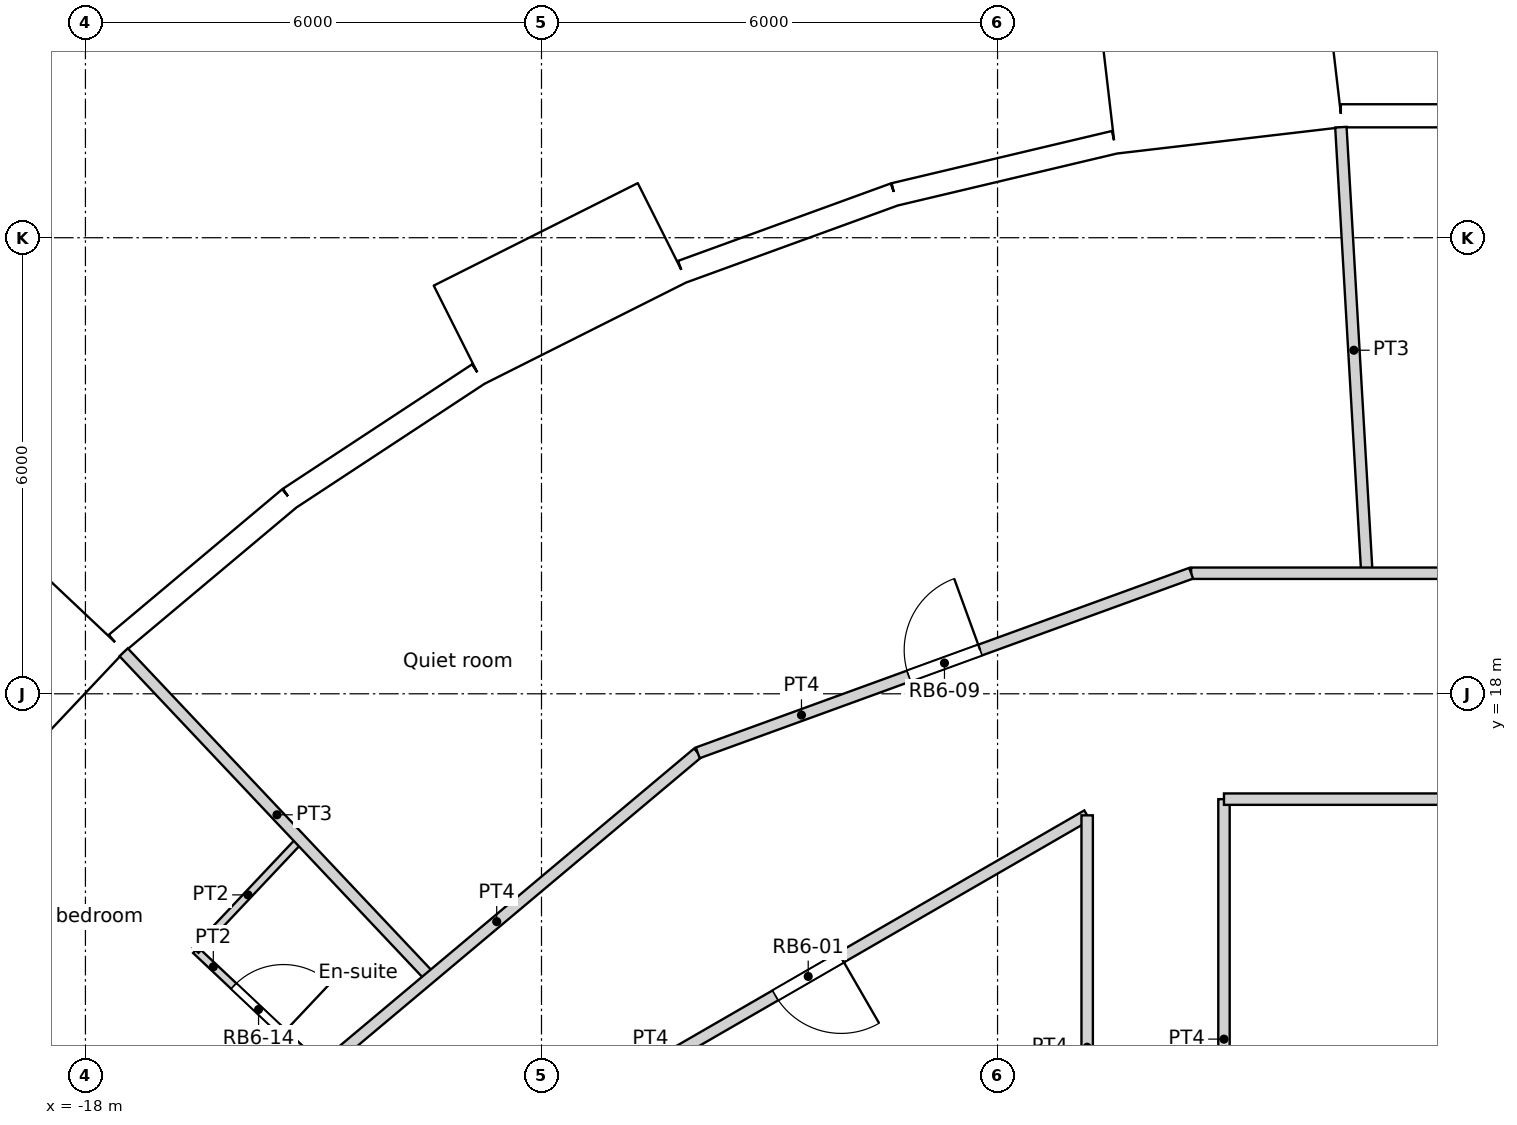
"""IFC4 building model, lengths in metres.
Left out: names, types, materials, properties, quantities, classifications, styles, units other than length and angle.
Written with IfcOpenShell. Run it as: python <this file> out.ifc"""

import sys

from ifc_helpers import new_model, si_unit, direction, frame, frame_2d, origin, origin_2d, place, context, subcontext, project, spatial, rectangle, circle, extrude, element, fill, save


model = new_model("IFC4")
c1 = context("Model", 3, precision=1e-05, world=origin(), true_north=direction((0.0, 1.0)))
c2 = subcontext(c1, "Body", "Model", "MODEL_VIEW")
j1 = project(units=[si_unit("LENGTHUNIT", "METRE"), si_unit("PLANEANGLEUNIT", "RADIAN")], contexts=[c1])
p1 = place(None, origin())
s1 = spatial("IfcSite", under=j1, at=p1, CompositionType="ELEMENT")
p2 = place(p1, origin())
s2 = spatial("IfcBuilding", under=s1, at=p2, CompositionType="ELEMENT")
p3 = place(p2, frame((0.0, 0.0, 180.0)))
s3 = spatial("IfcBuildingStorey", under=s2, at=p3, CompositionType="ELEMENT", Elevation=180.0)
for number, where, z_axis, x_axis in (
    (1, (-1.427, 24.506, 0.0), (0.0, 0.0, 1.0), (1.0, 0.0, 0.0)),
    (2, (-7.04, 23.516, 0.0), (0.0, 0.0, 1.0), (1.0, 0.0, 0.0)),
    (3, (-12.274, 21.259, 0.0), (0.0, 0.0, 1.0), (1.0, 0.0, 0.0)),
    (4, (-16.846, 17.855, 0.0), (0.0, 0.0, 1.0), (1.0, 0.0, 0.0)),
):
    element("IfcColumn", number, at=place(p3, frame(where, z_axis=z_axis, x_axis=x_axis)), inside=s3, PredefinedType="COLUMN", context=c2, shape_type="SweptSolid", body=[
        extrude(circle(Radius=0.6, at=origin_2d()), origin(), (0.0, 0.0, 1.0), 3.6),
    ])
for number, where, z_axis, x_axis in (
    (5, (-4.188, 18.35, 0.0), (0.0, 0.0, 1.0), (1.0, 0.0, 0.0)),
    (6, (-9.411, 16.301, 0.0), (0.0, 0.0, 1.0), (1.0, 0.0, 0.0)),
    (7, (-13.798, 12.802, 0.0), (0.0, 0.0, 1.0), (1.0, 0.0, 0.0)),
):
    element("IfcColumn", number, at=place(p3, frame(where, z_axis=z_axis, x_axis=x_axis)), inside=s3, PredefinedType="COLUMN", context=c2, shape_type="SweptSolid", body=[
        extrude(circle(Radius=0.65, at=origin_2d()), origin(), (0.0, 0.0, 1.0), 3.6),
    ])
p4 = place(p3, frame((1.491, 25.604, 0.0), z_axis=(0.0, 0.0, 1.0), x_axis=(-1.0, 0.0, 0.0)))
e8 = element("IfcWall", 8, at=p4, inside=s3, PredefinedType="SOLIDWALL", context=c2, shape_type="SweptSolid", body=[
    extrude(rectangle(XDim=2.973, YDim=0.3, at=frame_2d((1.486, 0.0))), origin(), (0.0, 0.0, 1.0), 3.3),
])
p5 = place(p4, frame((1.486, 0.0, 1.55)))
e9 = element("IfcOpeningElement", 9, at=p5, cuts=e8, PredefinedType="OPENING", context=c2, shape_type="SweptSolid", body=[
    extrude(circle(Radius=0.9, at=origin_2d()), frame((0.0, 0.16, 0.0), z_axis=(0.0, -1.0, 0.0), x_axis=(1.0, 0.0, 0.0)), (0.0, 0.0, 1.0), 0.32),
])
p6 = place(p3, frame((-1.549, 26.176, -0.3), z_axis=(0.0, 0.0, 1.0), x_axis=(-0.9932342274, -0.116128246006, 0.0)))
e10 = element("IfcWall", 10, at=p6, inside=s3, PredefinedType="ELEMENTEDWALL", context=c2, shape_type="SweptSolid", body=[
    extrude(rectangle(XDim=3.0, YDim=1.45, at=frame_2d((1.5, 0.0))), origin(), (0.0, 0.0, 1.0), 3.6),
])
p7 = place(p6, frame((1.5, 0.0, 1.85)))
e11 = element("IfcOpeningElement", 11, at=p7, cuts=e10, PredefinedType="OPENING", context=c2, shape_type="SweptSolid", body=[
    extrude(circle(Radius=0.9, at=origin_2d()), frame((0.0, 0.735, 0.0), z_axis=(0.0, -1.0, 0.0), x_axis=(1.0, 0.0, 0.0)), (0.0, 0.0, 1.0), 1.47),
])
p8 = place(p3, frame((-4.463, 25.256, 0.0), z_axis=(0.0, 0.0, 1.0), x_axis=(-0.973045378923, -0.230613725862, 0.0)))
e12 = element("IfcWall", 12, at=p8, inside=s3, PredefinedType="SOLIDWALL", context=c2, shape_type="SweptSolid", body=[
    extrude(rectangle(XDim=2.973, YDim=0.3, at=frame_2d((1.486, 0.0))), origin(), (0.0, 0.0, 1.0), 3.3),
])
p9 = place(p8, frame((1.486, 0.0, 1.55)))
e13 = element("IfcOpeningElement", 13, at=p9, cuts=e12, PredefinedType="OPENING", context=c2, shape_type="SweptSolid", body=[
    extrude(circle(Radius=0.9, at=origin_2d()), frame((0.0, 0.16, 0.0), z_axis=(0.0, -1.0, 0.0), x_axis=(1.0, 0.0, 0.0)), (0.0, 0.0, 1.0), 0.32),
])
p10 = place(p3, frame((-7.356, 24.57, 0.0), z_axis=(0.0, 0.0, 1.0), x_axis=(-0.939690282133, -0.342026568652, 0.0)))
e14 = element("IfcWall", 14, at=p10, inside=s3, PredefinedType="SOLIDWALL", context=c2, shape_type="SweptSolid", body=[
    extrude(rectangle(XDim=2.973, YDim=0.3, at=frame_2d((1.486, 0.0))), origin(), (0.0, 0.0, 1.0), 3.3),
])
p11 = place(p10, frame((1.486, 0.0, 1.55)))
e15 = element("IfcOpeningElement", 15, at=p11, cuts=e14, PredefinedType="OPENING", context=c2, shape_type="SweptSolid", body=[
    extrude(circle(Radius=0.9, at=origin_2d()), frame((0.0, 0.16, 0.0), z_axis=(0.0, -1.0, 0.0), x_axis=(1.0, 0.0, 0.0)), (0.0, 0.0, 1.0), 0.32),
])
p12 = place(p3, frame((-10.409, 24.068, -0.3), z_axis=(0.0, 0.0, 1.0), x_axis=(-0.893628249713, -0.448807922518, 0.0)))
e16 = element("IfcWall", 16, at=p12, inside=s3, PredefinedType="ELEMENTEDWALL", context=c2, shape_type="SweptSolid", body=[
    extrude(rectangle(XDim=3.0, YDim=1.45, at=frame_2d((1.5, 0.0))), origin(), (0.0, 0.0, 1.0), 3.6),
])
p13 = place(p12, frame((1.5, 0.0, 1.85)))
e17 = element("IfcOpeningElement", 17, at=p13, cuts=e16, PredefinedType="OPENING", context=c2, shape_type="SweptSolid", body=[
    extrude(circle(Radius=0.9, at=origin_2d()), frame((0.0, 0.735, 0.0), z_axis=(0.0, -1.0, 0.0), x_axis=(1.0, 0.0, 0.0)), (0.0, 0.0, 1.0), 1.47),
])
p14 = place(p3, frame((-12.832, 22.206, 0.0), z_axis=(0.0, 0.0, 1.0), x_axis=(-0.835508361394, -0.54947773207, 0.0)))
e18 = element("IfcWall", 18, at=p14, inside=s3, PredefinedType="SOLIDWALL", context=c2, shape_type="SweptSolid", body=[
    extrude(rectangle(XDim=2.973, YDim=0.3, at=frame_2d((1.486, 0.0))), origin(), (0.0, 0.0, 1.0), 3.3),
])
p15 = place(p14, frame((1.486, 0.0, 1.55)))
e19 = element("IfcOpeningElement", 19, at=p15, cuts=e18, PredefinedType="OPENING", context=c2, shape_type="SweptSolid", body=[
    extrude(circle(Radius=0.9, at=origin_2d()), frame((0.0, 0.16, 0.0), z_axis=(0.0, -1.0, 0.0), x_axis=(1.0, 0.0, 0.0)), (0.0, 0.0, 1.0), 0.32),
])
p16 = place(p3, frame((-15.316, 20.573, 0.0), z_axis=(0.0, 0.0, 1.0), x_axis=(-0.766008913364, -0.642829950023, 0.0)))
e20 = element("IfcWall", 20, at=p16, inside=s3, PredefinedType="SOLIDWALL", context=c2, shape_type="SweptSolid", body=[
    extrude(rectangle(XDim=2.973, YDim=0.3, at=frame_2d((1.486, 0.0))), origin(), (0.0, 0.0, 1.0), 3.3),
])
p17 = place(p16, frame((1.486, 0.0, 1.55)))
e21 = element("IfcOpeningElement", 21, at=p17, cuts=e20, PredefinedType="OPENING", context=c2, shape_type="SweptSolid", body=[
    extrude(circle(Radius=0.9, at=origin_2d()), frame((0.0, 0.16, 0.0), z_axis=(0.0, -1.0, 0.0), x_axis=(1.0, 0.0, 0.0)), (0.0, 0.0, 1.0), 0.32),
])
p18 = place(p3, frame((-18.013, 19.056, -0.3), z_axis=(0.0, 0.0, 1.0), x_axis=(-0.686217177108, -0.727396718334, 0.0)))
e22 = element("IfcWall", 22, at=p18, inside=s3, PredefinedType="ELEMENTEDWALL", context=c2, shape_type="SweptSolid", body=[
    extrude(rectangle(XDim=3.0, YDim=1.45, at=frame_2d((1.5, 0.0))), origin(), (0.0, 0.0, 1.0), 3.6),
])
p19 = place(p18, frame((1.5, 0.0, 1.85)))
e23 = element("IfcOpeningElement", 23, at=p19, cuts=e22, PredefinedType="OPENING", context=c2, shape_type="SweptSolid", body=[
    extrude(circle(Radius=0.9, at=origin_2d()), frame((0.0, 0.735, 0.0), z_axis=(0.0, -1.0, 0.0), x_axis=(1.0, 0.0, 0.0)), (0.0, 0.0, 1.0), 1.47),
])
p20 = place(p3, frame((-4.821, 10.3, 0.0), z_axis=(0.0, 0.0, 1.0), x_axis=(0.0, 1.0, 0.0)))
e24 = element("IfcWall", 24, at=p20, inside=s3, PredefinedType="PARTITIONING", context=c2, shape_type="SweptSolid", body=[
    extrude(rectangle(XDim=6.101, YDim=0.15, at=frame_2d((3.05, 0.0))), origin(), (0.0, 0.0, 1.0), 3.3),
])
p21 = place(p3, frame((-12.162, 12.162, 0.0), z_axis=(0.0, 0.0, 1.0), x_axis=(0.866004766557, 0.500035743023, 0.0)))
e25 = element("IfcWall", 25, at=p21, inside=s3, PredefinedType="PARTITIONING", context=c2, shape_type="SweptSolid", body=[
    extrude(rectangle(XDim=8.477, YDim=0.15, at=frame_2d((4.239, 0.0))), origin(), (0.0, 0.0, 1.0), 3.3),
])
p22 = place(p21, frame((3.739, 0.0, 0.0)))
e26 = element("IfcOpeningElement", 26, at=p22, cuts=e25, PredefinedType="OPENING", context=c2, shape_type="SweptSolid", body=[
    extrude(rectangle(XDim=1.0, YDim=2.04, at=frame_2d((0.5, 1.02))), frame((0.0, 0.075, 0.0), z_axis=(0.0, -1.0, 0.0), x_axis=(1.0, 0.0, 0.0)), (0.0, 0.0, 1.0), 0.15),
])
p23 = place(p3, frame((-3.021, 16.614, 0.0), z_axis=(0.0, 0.0, 1.0), x_axis=(1.0, 0.0, 0.0)))
e27 = element("IfcWall", 27, at=p23, inside=s3, PredefinedType="PARTITIONING", context=c2, shape_type="SweptSolid", body=[
    extrude(rectangle(XDim=7.473, YDim=0.15, at=frame_2d((3.736, 0.0))), origin(), (0.0, 0.0, 1.0), 3.3),
])
p24 = place(p3, frame((-3.021, 10.3, 0.0), z_axis=(0.0, 0.0, 1.0), x_axis=(0.0, 1.0, 0.0)))
e28 = element("IfcWall", 28, at=p24, inside=s3, PredefinedType="PARTITIONING", context=c2, shape_type="SweptSolid", body=[
    extrude(rectangle(XDim=6.314, YDim=0.15, at=frame_2d((3.157, 0.0))), origin(), (0.0, 0.0, 1.0), 3.3),
])
p25 = place(p3, frame((-3.453, 19.586, 0.0), z_axis=(0.0, 0.0, 1.0), x_axis=(1.0, 0.0, 0.0)))
e29 = element("IfcWall", 29, at=p25, inside=s3, PredefinedType="PARTITIONING", context=c2, shape_type="SweptSolid", body=[
    extrude(rectangle(XDim=6.906, YDim=0.15, at=frame_2d((3.453, 0.0))), origin(), (0.0, 0.0, 1.0), 3.3),
])
p26 = place(p3, frame((-15.234, 12.783, 0.0), z_axis=(0.0, 0.0, 1.0), x_axis=(0.765968036922, 0.642878656058, 0.0)))
e30 = element("IfcWall", 30, at=p26, inside=s3, PredefinedType="PARTITIONING", context=c2, shape_type="SweptSolid", body=[
    extrude(rectangle(XDim=6.906, YDim=0.15, at=frame_2d((3.453, 0.0))), origin(), (0.0, 0.0, 1.0), 3.3),
])
p27 = place(p3, frame((-9.944, 17.223, 0.0), z_axis=(0.0, 0.0, 1.0), x_axis=(0.939672634566, 0.342075050021, 0.0)))
e31 = element("IfcWall", 31, at=p27, inside=s3, PredefinedType="PARTITIONING", context=c2, shape_type="SweptSolid", body=[
    extrude(rectangle(XDim=6.908, YDim=0.15, at=frame_2d((3.454, 0.0))), origin(), (0.0, 0.0, 1.0), 3.3),
])
p28 = place(p27, frame((2.954, 0.0, 0.0)))
e32 = element("IfcOpeningElement", 32, at=p28, cuts=e31, PredefinedType="OPENING", context=c2, shape_type="SweptSolid", body=[
    extrude(rectangle(XDim=1.0, YDim=2.04, at=frame_2d((0.5, 1.02))), frame((0.0, 0.075, 0.0), z_axis=(0.0, -1.0, 0.0), x_axis=(1.0, 0.0, 0.0)), (0.0, 0.0, 1.0), 0.15),
])
p29 = place(p3, frame((-1.483, 25.454, 0.0), z_axis=(0.0, 0.0, 1.0), x_axis=(0.058147412668, -0.998308007781, 0.0)))
e33 = element("IfcWall", 33, at=p29, inside=s3, PredefinedType="PARTITIONING", context=c2, shape_type="SweptSolid", body=[
    extrude(rectangle(XDim=5.878, YDim=0.15, at=frame_2d((2.939, 0.0))), origin(), (0.0, 0.0, 1.0), 3.3),
])
p30 = place(p3, frame((-17.497, 18.546, 0.0), z_axis=(0.0, 0.0, 1.0), x_axis=(0.68633567779, -0.727284907991, 0.0)))
e34 = element("IfcWall", 34, at=p30, inside=s3, PredefinedType="PARTITIONING", context=c2, shape_type="SweptSolid", body=[
    extrude(rectangle(XDim=5.879, YDim=0.15, at=frame_2d((2.939, 0.0))), origin(), (0.0, 0.0, 1.0), 3.3),
])
p31 = place(p3, frame((-21.303, 14.011, 0.0), z_axis=(0.0, 0.0, 1.0), x_axis=(0.835501457061, -0.549488230309, 0.0)))
e35 = element("IfcWall", 35, at=p31, inside=s3, PredefinedType="PARTITIONING", context=c2, shape_type="SweptSolid", body=[
    extrude(rectangle(XDim=3.845, YDim=0.1, at=frame_2d((1.923, 0.0))), origin(), (0.0, 0.0, 1.0), 3.3),
])
p32 = place(p31, frame((2.15, 0.0, 0.0)))
e36 = element("IfcOpeningElement", 36, at=p32, cuts=e35, PredefinedType="OPENING", context=c2, shape_type="SweptSolid", body=[
    extrude(rectangle(XDim=0.9, YDim=2.1, at=frame_2d((0.45, 1.05))), frame((0.0, 0.05, 0.0), z_axis=(0.0, -1.0, 0.0), x_axis=(1.0, 0.0, 0.0)), (0.0, 0.0, 1.0), 0.1),
])
p33 = place(p3, frame((-16.549, 14.626, 0.0), z_axis=(0.0, 0.0, 1.0), x_axis=(0.686337209023, 0.727283462971, 0.0)))
e37 = element("IfcWall", 37, at=p33, inside=s3, PredefinedType="PARTITIONING", context=c2, shape_type="SweptSolid", body=[
    extrude(rectangle(XDim=2.003, YDim=0.1, at=frame_2d((1.002, 0.0))), origin(), (0.0, 0.0, 1.0), 3.3),
])
p34 = place(p3, frame((-16.549, 14.626, 0.0), z_axis=(0.0, 0.0, 1.0), x_axis=(0.727754926423, -0.68583727448, 0.0)))
e38 = element("IfcWall", 38, at=p34, inside=s3, PredefinedType="PARTITIONING", context=c2, shape_type="SweptSolid", body=[
    extrude(rectangle(XDim=2.271, YDim=0.1, at=frame_2d((1.136, 0.0))), origin(), (0.0, 0.0, 1.0), 3.3),
])
p35 = place(p34, frame((0.686, 0.0, 0.0)))
e39 = element("IfcOpeningElement", 39, at=p35, cuts=e38, PredefinedType="OPENING", context=c2, shape_type="SweptSolid", body=[
    extrude(rectangle(XDim=0.9, YDim=2.04, at=frame_2d((0.45, 1.02))), frame((0.0, 0.05, 0.0), z_axis=(0.0, -1.0, 0.0), x_axis=(1.0, 0.0, 0.0)), (0.0, 0.0, 1.0), 0.1),
])
p36 = place(p5, origin())
e40 = element("IfcWindow", 40, at=p36, inside=s3, PartitioningType="SINGLE_PANEL", PredefinedType="WINDOW", context=c2, shape_type="SweptSolid", body=[
    extrude(circle(Radius=0.9, at=origin_2d()), frame((0.0, 0.12, 0.0), z_axis=(0.0, -1.0, 0.0), x_axis=(1.0, 0.0, 0.0)), (0.0, 0.0, 1.0), 0.1),
])
fill(e9, e40)
p37 = place(p7, origin())
e41 = element("IfcWindow", 41, at=p37, inside=s3, PartitioningType="SINGLE_PANEL", PredefinedType="WINDOW", context=c2, shape_type="SweptSolid", body=[
    extrude(circle(Radius=0.9, at=origin_2d()), frame((0.0, 0.695, 0.0), z_axis=(0.0, -1.0, 0.0), x_axis=(1.0, 0.0, 0.0)), (0.0, 0.0, 1.0), 0.1),
])
fill(e11, e41)
p38 = place(p9, origin())
e42 = element("IfcWindow", 42, at=p38, inside=s3, PartitioningType="SINGLE_PANEL", PredefinedType="WINDOW", context=c2, shape_type="SweptSolid", body=[
    extrude(circle(Radius=0.9, at=origin_2d()), frame((0.0, 0.12, 0.0), z_axis=(0.0, -1.0, 0.0), x_axis=(1.0, 0.0, 0.0)), (0.0, 0.0, 1.0), 0.1),
])
fill(e13, e42)
p39 = place(p11, origin())
e43 = element("IfcWindow", 43, at=p39, inside=s3, PartitioningType="SINGLE_PANEL", PredefinedType="WINDOW", context=c2, shape_type="SweptSolid", body=[
    extrude(circle(Radius=0.9, at=origin_2d()), frame((0.0, 0.12, 0.0), z_axis=(0.0, -1.0, 0.0), x_axis=(1.0, 0.0, 0.0)), (0.0, 0.0, 1.0), 0.1),
])
fill(e15, e43)
p40 = place(p13, origin())
e44 = element("IfcWindow", 44, at=p40, inside=s3, PartitioningType="SINGLE_PANEL", PredefinedType="WINDOW", context=c2, shape_type="SweptSolid", body=[
    extrude(circle(Radius=0.9, at=origin_2d()), frame((0.0, 0.695, 0.0), z_axis=(0.0, -1.0, 0.0), x_axis=(1.0, 0.0, 0.0)), (0.0, 0.0, 1.0), 0.1),
])
fill(e17, e44)
p41 = place(p15, origin())
e45 = element("IfcWindow", 45, at=p41, inside=s3, PartitioningType="SINGLE_PANEL", PredefinedType="WINDOW", context=c2, shape_type="SweptSolid", body=[
    extrude(circle(Radius=0.9, at=origin_2d()), frame((0.0, 0.12, 0.0), z_axis=(0.0, -1.0, 0.0), x_axis=(1.0, 0.0, 0.0)), (0.0, 0.0, 1.0), 0.1),
])
fill(e19, e45)
p42 = place(p17, origin())
e46 = element("IfcWindow", 46, at=p42, inside=s3, PartitioningType="SINGLE_PANEL", PredefinedType="WINDOW", context=c2, shape_type="SweptSolid", body=[
    extrude(circle(Radius=0.9, at=origin_2d()), frame((0.0, 0.12, 0.0), z_axis=(0.0, -1.0, 0.0), x_axis=(1.0, 0.0, 0.0)), (0.0, 0.0, 1.0), 0.1),
])
fill(e21, e46)
p43 = place(p19, origin())
e47 = element("IfcWindow", 47, at=p43, inside=s3, PartitioningType="SINGLE_PANEL", PredefinedType="WINDOW", context=c2, shape_type="SweptSolid", body=[
    extrude(circle(Radius=0.9, at=origin_2d()), frame((0.0, 0.695, 0.0), z_axis=(0.0, -1.0, 0.0), x_axis=(1.0, 0.0, 0.0)), (0.0, 0.0, 1.0), 0.1),
])
fill(e23, e47)
p44 = place(p22, origin())
e48 = element("IfcDoor", 48, at=p44, inside=s3, OperationType="SINGLE_SWING_LEFT", PredefinedType="DOOR", context=c2, shape_type="SweptSolid", body=[
    extrude(rectangle(XDim=1.0, YDim=2.04, at=frame_2d((0.5, 1.02))), frame((0.0, 0.025, 0.0), z_axis=(0.0, -1.0, 0.0), x_axis=(1.0, 0.0, 0.0)), (0.0, 0.0, 1.0), 0.05),
])
fill(e26, e48)
p45 = place(p28, origin())
e49 = element("IfcDoor", 49, at=p45, inside=s3, OperationType="SINGLE_SWING_RIGHT", PredefinedType="DOOR", context=c2, shape_type="SweptSolid", body=[
    extrude(rectangle(XDim=1.0, YDim=2.04, at=frame_2d((0.5, 1.02))), frame((0.0, 0.025, 0.0), z_axis=(0.0, -1.0, 0.0), x_axis=(1.0, 0.0, 0.0)), (0.0, 0.0, 1.0), 0.05),
])
fill(e32, e49)
p46 = place(p35, origin())
e50 = element("IfcDoor", 50, at=p46, inside=s3, OperationType="SINGLE_SWING_RIGHT", PredefinedType="DOOR", context=c2, shape_type="SweptSolid", body=[
    extrude(rectangle(XDim=0.9, YDim=2.04, at=frame_2d((0.45, 1.02))), frame((0.0, 0.025, 0.0), z_axis=(0.0, -1.0, 0.0), x_axis=(1.0, 0.0, 0.0)), (0.0, 0.0, 1.0), 0.05),
])
fill(e39, e50)
save(model, sys.argv[1])
